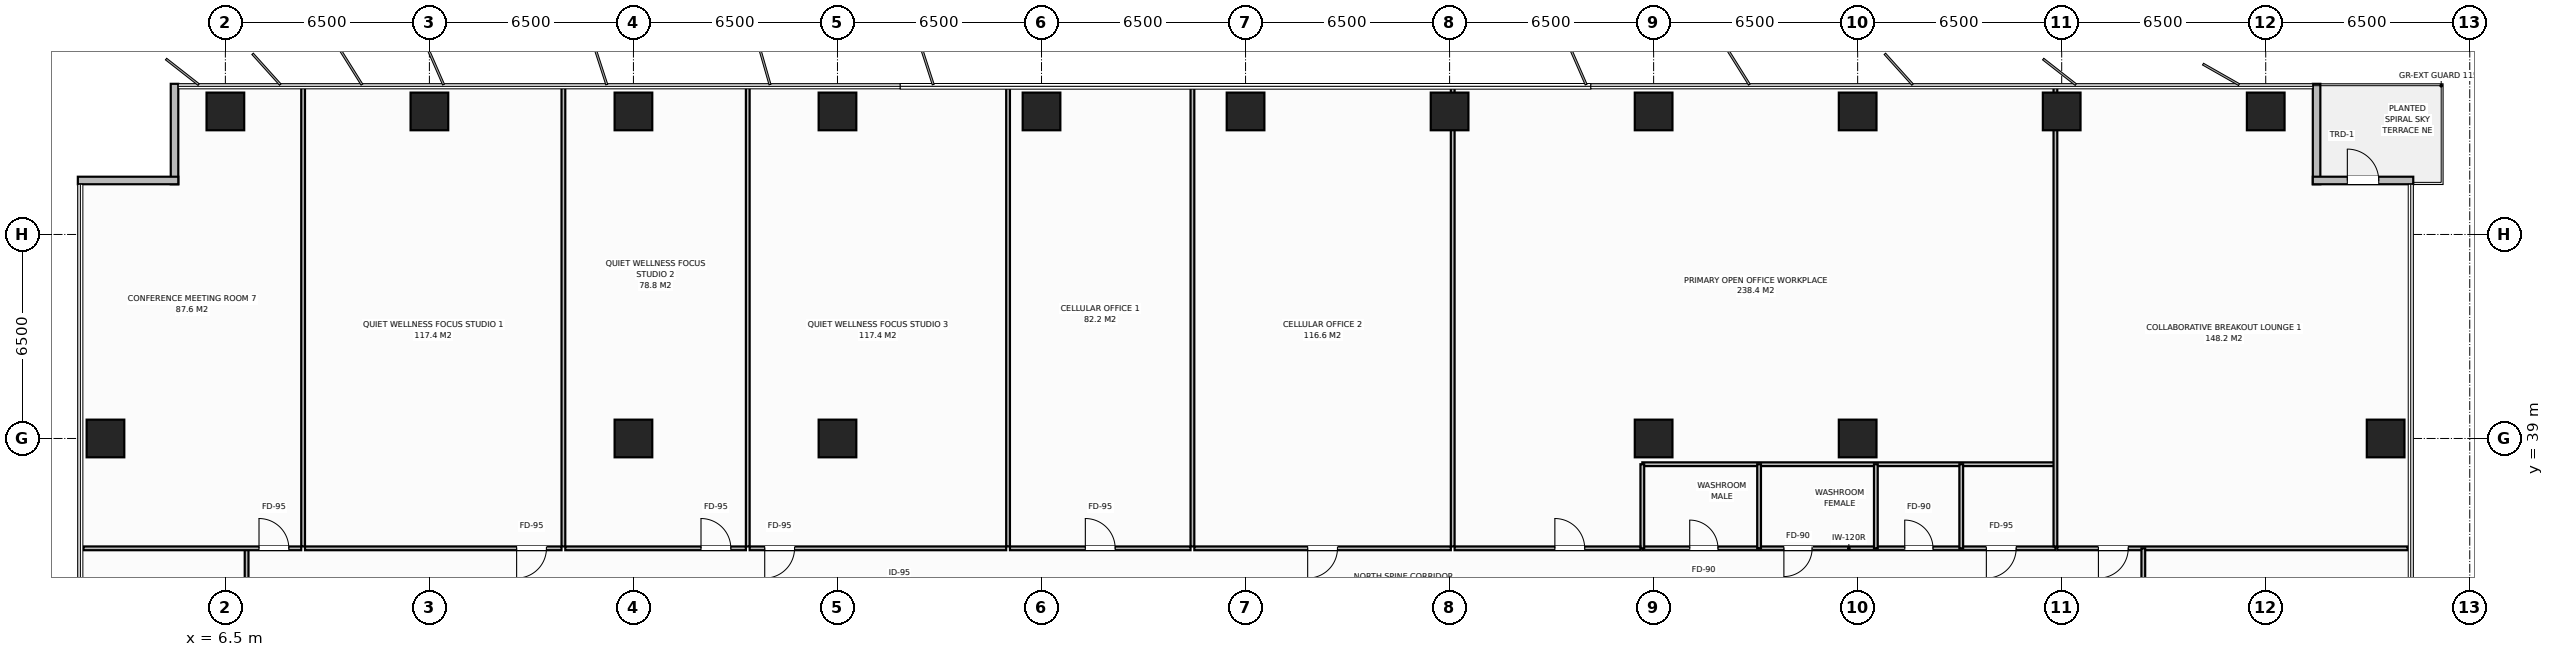
"""IFC4 building model, lengths in metres.
Left out: names, types, materials, properties, quantities, classifications, styles, units other than length and angle.
Written with IfcOpenShell. Run it as: python <this file> out.ifc"""

import sys

from ifc_helpers import new_model, si_unit, direction, frame, frame_2d, origin, origin_2d, place, context, subcontext, project, spatial, rectangle, extrude, element, fill, save


model = new_model("IFC4")
c1 = context("Model", 3, precision=1e-05, world=origin(), true_north=direction((0.0, 1.0)))
c2 = subcontext(c1, "Body", "Model", "MODEL_VIEW")
j1 = project(units=[si_unit("LENGTHUNIT", "METRE"), si_unit("PLANEANGLEUNIT", "RADIAN")], contexts=[c1])
p1 = place(None, origin())
s1 = spatial("IfcSite", under=j1, at=p1, CompositionType="ELEMENT")
p2 = place(p1, origin())
s2 = spatial("IfcBuilding", under=s1, at=p2, CompositionType="ELEMENT")
p3 = place(p2, frame((0.0, 0.0, 127.8)))
s3 = spatial("IfcBuildingStorey", under=s2, at=p3, CompositionType="ELEMENT", Elevation=127.8)
for number, where, z_axis, x_axis in (
    (1, (19.5, 39.0, 0.0), (0.0, 0.0, 1.0), (1.0, 0.0, 0.0)),
    (2, (58.5, 39.0, 0.0), (0.0, 0.0, 1.0), (1.0, 0.0, 0.0)),
    (3, (26.0, 39.0, 0.0), (0.0, 0.0, 1.0), (1.0, 0.0, 0.0)),
    (4, (52.0, 39.0, 0.0), (0.0, 0.0, 1.0), (1.0, 0.0, 0.0)),
    (5, (6.5, 49.42, 0.0), (0.0, 0.0, 1.0), (1.0, 0.0, 0.0)),
    (6, (13.0, 49.42, 0.0), (0.0, 0.0, 1.0), (1.0, 0.0, 0.0)),
    (7, (19.5, 49.42, 0.0), (0.0, 0.0, 1.0), (1.0, 0.0, 0.0)),
    (8, (26.0, 49.42, 0.0), (0.0, 0.0, 1.0), (1.0, 0.0, 0.0)),
    (9, (32.5, 49.42, 0.0), (0.0, 0.0, 1.0), (1.0, 0.0, 0.0)),
    (10, (39.0, 49.42, 0.0), (0.0, 0.0, 1.0), (1.0, 0.0, 0.0)),
    (11, (45.5, 49.42, 0.0), (0.0, 0.0, 1.0), (1.0, 0.0, 0.0)),
    (12, (52.0, 49.42, 0.0), (0.0, 0.0, 1.0), (1.0, 0.0, 0.0)),
    (13, (58.5, 49.42, 0.0), (0.0, 0.0, 1.0), (1.0, 0.0, 0.0)),
    (14, (65.0, 49.42, 0.0), (0.0, 0.0, 1.0), (1.0, 0.0, 0.0)),
    (15, (71.5, 49.42, 0.0), (0.0, 0.0, 1.0), (1.0, 0.0, 0.0)),
    (16, (2.68, 39.0, 0.0), (0.0, 0.0, 1.0), (1.0, 0.0, 0.0)),
    (17, (75.32, 39.0, 0.0), (0.0, 0.0, 1.0), (1.0, 0.0, 0.0)),
):
    element("IfcColumn", number, at=place(p3, frame(where, z_axis=z_axis, x_axis=x_axis)), inside=s3, PredefinedType="COLUMN", context=c2, shape_type="SweptSolid", body=[
        extrude(rectangle(XDim=1.2, YDim=1.2, at=origin_2d()), origin(), (0.0, 0.0, 1.0), 3.8),
    ])
for number, where, z_axis, x_axis in (
    (18, (4.88, 47.1, 0.0), (0.0, 0.0, 1.0), (0.0, 1.0, 0.0)),
    (19, (1.8, 47.22, 0.0), (0.0, 0.0, 1.0), (1.0, 0.0, 0.0)),
    (20, (73.12, 50.3, 0.0), (0.0, 0.0, 1.0), (0.0, -1.0, 0.0)),
):
    element("IfcWall", number, at=place(p3, frame(where, z_axis=z_axis, x_axis=x_axis)), inside=s3, PredefinedType="STANDARD", context=c2, shape_type="SweptSolid", body=[
        extrude(rectangle(XDim=3.2, YDim=0.24, at=frame_2d((1.6, 0.0))), origin(), (0.0, 0.0, 1.0), 3.565),
    ])
p4 = place(p3, frame((73.0, 47.22, 0.0), z_axis=(0.0, 0.0, 1.0), x_axis=(1.0, 0.0, 0.0)))
e21 = element("IfcWall", 21, at=p4, inside=s3, PredefinedType="STANDARD", context=c2, shape_type="SweptSolid", body=[
    extrude(rectangle(XDim=3.2, YDim=0.24, at=frame_2d((1.6, 0.0))), origin(), (0.0, 0.0, 1.0), 3.565),
])
p5 = place(p4, frame((1.1, 0.0, 0.0)))
e22 = element("IfcOpeningElement", 22, at=p5, cuts=e21, PredefinedType="OPENING", context=c2, shape_type="SweptSolid", body=[
    extrude(rectangle(XDim=1.0, YDim=2.2, at=frame_2d((0.5, 1.1))), frame((0.0, 0.13, 0.0), z_axis=(0.0, -1.0, 0.0), x_axis=(1.0, 0.0, 0.0)), (0.0, 0.0, 1.0), 0.26),
])
p6 = place(p3, frame((7.177, 33.4, 0.0), z_axis=(0.0, 0.0, 1.0), x_axis=(0.0, 1.0, 0.0)))
e23 = element("IfcWall", 23, at=p6, inside=s3, PredefinedType="PARTITIONING", context=c2, shape_type="SweptSolid", body=[
    extrude(rectangle(XDim=2.1, YDim=0.12, at=frame_2d((1.05, 0.0))), origin(), (0.0, 0.0, 1.0), 3.565),
])
p7 = place(p3, frame((51.64, 35.5, 0.0), z_axis=(0.0, 0.0, 1.0), x_axis=(1.0, 0.0, 0.0)))
e24 = element("IfcWall", 24, at=p7, inside=s3, PredefinedType="PARTITIONING", context=c2, shape_type="SweptSolid", body=[
    extrude(rectangle(XDim=13.16, YDim=0.12, at=frame_2d((6.58, 0.0))), origin(), (0.0, 0.0, 1.0), 3.565),
])
p8 = place(p7, frame((1.51, 0.0, 0.0)))
e25 = element("IfcOpeningElement", 25, at=p8, cuts=e24, PredefinedType="OPENING", context=c2, shape_type="SweptSolid", body=[
    extrude(rectangle(XDim=0.9, YDim=2.15, at=frame_2d((0.45, 1.075))), frame((0.0, 0.07, 0.0), z_axis=(0.0, -1.0, 0.0), x_axis=(1.0, 0.0, 0.0)), (0.0, 0.0, 1.0), 0.14),
])
p9 = place(p7, frame((4.51, 0.0, 0.0)))
e26 = element("IfcOpeningElement", 26, at=p9, cuts=e24, PredefinedType="OPENING", context=c2, shape_type="SweptSolid", body=[
    extrude(rectangle(XDim=0.9, YDim=2.15, at=frame_2d((0.45, 1.075))), frame((0.0, 0.07, 0.0), z_axis=(0.0, -1.0, 0.0), x_axis=(1.0, 0.0, 0.0)), (0.0, 0.0, 1.0), 0.14),
])
p10 = place(p7, frame((8.36, 0.0, 0.0)))
e27 = element("IfcOpeningElement", 27, at=p10, cuts=e24, PredefinedType="OPENING", context=c2, shape_type="SweptSolid", body=[
    extrude(rectangle(XDim=0.9, YDim=2.15, at=frame_2d((0.45, 1.075))), frame((0.0, 0.07, 0.0), z_axis=(0.0, -1.0, 0.0), x_axis=(1.0, 0.0, 0.0)), (0.0, 0.0, 1.0), 0.14),
])
p11 = place(p7, frame((10.96, 0.0, 0.0)))
e28 = element("IfcOpeningElement", 28, at=p11, cuts=e24, PredefinedType="OPENING", context=c2, shape_type="SweptSolid", body=[
    extrude(rectangle(XDim=0.95, YDim=2.15, at=frame_2d((0.475, 1.075))), frame((0.0, 0.07, 0.0), z_axis=(0.0, -1.0, 0.0), x_axis=(1.0, 0.0, 0.0)), (0.0, 0.0, 1.0), 0.14),
])
p12 = place(p3, frame((51.64, 38.18, 0.0), z_axis=(0.0, 0.0, 1.0), x_axis=(1.0, 0.0, 0.0)))
e29 = element("IfcWall", 29, at=p12, inside=s3, PredefinedType="PARTITIONING", context=c2, shape_type="SweptSolid", body=[
    extrude(rectangle(XDim=13.16, YDim=0.12, at=frame_2d((6.58, 0.0))), origin(), (0.0, 0.0, 1.0), 3.565),
])
for number, where, z_axis, x_axis in (
    (30, (51.64, 35.5, 0.0), (0.0, 0.0, 1.0), (0.0, 1.0, 0.0)),
    (31, (55.36, 35.5, 0.0), (0.0, 0.0, 1.0), (0.0, 1.0, 0.0)),
    (32, (59.08, 35.5, 0.0), (0.0, 0.0, 1.0), (0.0, 1.0, 0.0)),
    (33, (61.8, 35.5, 0.0), (0.0, 0.0, 1.0), (0.0, 1.0, 0.0)),
):
    element("IfcWall", number, at=place(p3, frame(where, z_axis=z_axis, x_axis=x_axis)), inside=s3, PredefinedType="PARTITIONING", context=c2, shape_type="SweptSolid", body=[
        extrude(rectangle(XDim=2.68, YDim=0.12, at=frame_2d((1.34, 0.0))), origin(), (0.0, 0.0, 1.0), 3.565),
    ])
p13 = place(p3, frame((8.977, 35.56, 0.0), z_axis=(0.0, 0.0, 1.0), x_axis=(0.0, 1.0, 0.0)))
e34 = element("IfcWall", 34, at=p13, inside=s3, PredefinedType="PARTITIONING", context=c2, shape_type="SweptSolid", body=[
    extrude(rectangle(XDim=14.72, YDim=0.12, at=frame_2d((7.36, 0.0))), origin(), (0.0, 0.0, 1.0), 3.565),
])
p14 = place(p3, frame((1.98, 35.5, 0.0), z_axis=(0.0, 0.0, 1.0), x_axis=(1.0, 0.0, 0.0)))
e35 = element("IfcWall", 35, at=p14, inside=s3, PredefinedType="PARTITIONING", context=c2, shape_type="SweptSolid", body=[
    extrude(rectangle(XDim=6.937, YDim=0.12, at=frame_2d((3.468, 0.0))), origin(), (0.0, 0.0, 1.0), 3.565),
])
p15 = place(p14, frame((5.592, 0.0, 0.0)))
e36 = element("IfcOpeningElement", 36, at=p15, cuts=e35, PredefinedType="OPENING", context=c2, shape_type="SweptSolid", body=[
    extrude(rectangle(XDim=0.95, YDim=2.15, at=frame_2d((0.475, 1.075))), frame((0.0, 0.07, 0.0), z_axis=(0.0, -1.0, 0.0), x_axis=(1.0, 0.0, 0.0)), (0.0, 0.0, 1.0), 0.14),
])
p16 = place(p3, frame((17.269, 35.56, 0.0), z_axis=(0.0, 0.0, 1.0), x_axis=(0.0, 1.0, 0.0)))
e37 = element("IfcWall", 37, at=p16, inside=s3, PredefinedType="PARTITIONING", context=c2, shape_type="SweptSolid", body=[
    extrude(rectangle(XDim=14.72, YDim=0.12, at=frame_2d((7.36, 0.0))), origin(), (0.0, 0.0, 1.0), 3.565),
])
p17 = place(p3, frame((9.037, 35.5, 0.0), z_axis=(0.0, 0.0, 1.0), x_axis=(1.0, 0.0, 0.0)))
e38 = element("IfcWall", 38, at=p17, inside=s3, PredefinedType="PARTITIONING", context=c2, shape_type="SweptSolid", body=[
    extrude(rectangle(XDim=8.172, YDim=0.12, at=frame_2d((4.086, 0.0))), origin(), (0.0, 0.0, 1.0), 3.565),
])
p18 = place(p17, frame((6.742, 0.0, 0.0)))
e39 = element("IfcOpeningElement", 39, at=p18, cuts=e38, PredefinedType="OPENING", context=c2, shape_type="SweptSolid", body=[
    extrude(rectangle(XDim=0.95, YDim=2.15, at=frame_2d((0.475, 1.075))), frame((0.0, 0.07, 0.0), z_axis=(0.0, -1.0, 0.0), x_axis=(1.0, 0.0, 0.0)), (0.0, 0.0, 1.0), 0.14),
])
p19 = place(p3, frame((23.142, 35.56, 0.0), z_axis=(0.0, 0.0, 1.0), x_axis=(0.0, 1.0, 0.0)))
e40 = element("IfcWall", 40, at=p19, inside=s3, PredefinedType="PARTITIONING", context=c2, shape_type="SweptSolid", body=[
    extrude(rectangle(XDim=14.72, YDim=0.12, at=frame_2d((7.36, 0.0))), origin(), (0.0, 0.0, 1.0), 3.565),
])
p20 = place(p3, frame((17.329, 35.5, 0.0), z_axis=(0.0, 0.0, 1.0), x_axis=(1.0, 0.0, 0.0)))
e41 = element("IfcWall", 41, at=p20, inside=s3, PredefinedType="PARTITIONING", context=c2, shape_type="SweptSolid", body=[
    extrude(rectangle(XDim=5.754, YDim=0.12, at=frame_2d((2.877, 0.0))), origin(), (0.0, 0.0, 1.0), 3.565),
])
p21 = place(p20, frame((4.323, 0.0, 0.0)))
e42 = element("IfcOpeningElement", 42, at=p21, cuts=e41, PredefinedType="OPENING", context=c2, shape_type="SweptSolid", body=[
    extrude(rectangle(XDim=0.95, YDim=2.15, at=frame_2d((0.475, 1.075))), frame((0.0, 0.07, 0.0), z_axis=(0.0, -1.0, 0.0), x_axis=(1.0, 0.0, 0.0)), (0.0, 0.0, 1.0), 0.14),
])
p22 = place(p3, frame((31.434, 35.56, 0.0), z_axis=(0.0, 0.0, 1.0), x_axis=(0.0, 1.0, 0.0)))
e43 = element("IfcWall", 43, at=p22, inside=s3, PredefinedType="PARTITIONING", context=c2, shape_type="SweptSolid", body=[
    extrude(rectangle(XDim=14.72, YDim=0.12, at=frame_2d((7.36, 0.0))), origin(), (0.0, 0.0, 1.0), 3.565),
])
p23 = place(p3, frame((23.202, 35.5, 0.0), z_axis=(0.0, 0.0, 1.0), x_axis=(1.0, 0.0, 0.0)))
e44 = element("IfcWall", 44, at=p23, inside=s3, PredefinedType="PARTITIONING", context=c2, shape_type="SweptSolid", body=[
    extrude(rectangle(XDim=8.172, YDim=0.12, at=frame_2d((4.086, 0.0))), origin(), (0.0, 0.0, 1.0), 3.565),
])
p24 = place(p23, frame((0.48, 0.0, 0.0)))
e45 = element("IfcOpeningElement", 45, at=p24, cuts=e44, PredefinedType="OPENING", context=c2, shape_type="SweptSolid", body=[
    extrude(rectangle(XDim=0.95, YDim=2.15, at=frame_2d((0.475, 1.075))), frame((0.0, 0.07, 0.0), z_axis=(0.0, -1.0, 0.0), x_axis=(1.0, 0.0, 0.0)), (0.0, 0.0, 1.0), 0.14),
])
p25 = place(p3, frame((37.308, 35.56, 0.0), z_axis=(0.0, 0.0, 1.0), x_axis=(0.0, 1.0, 0.0)))
e46 = element("IfcWall", 46, at=p25, inside=s3, PredefinedType="PARTITIONING", context=c2, shape_type="SweptSolid", body=[
    extrude(rectangle(XDim=14.72, YDim=0.12, at=frame_2d((7.36, 0.0))), origin(), (0.0, 0.0, 1.0), 3.565),
])
p26 = place(p3, frame((31.494, 35.5, 0.0), z_axis=(0.0, 0.0, 1.0), x_axis=(1.0, 0.0, 0.0)))
e47 = element("IfcWall", 47, at=p26, inside=s3, PredefinedType="PARTITIONING", context=c2, shape_type="SweptSolid", body=[
    extrude(rectangle(XDim=5.753, YDim=0.12, at=frame_2d((2.877, 0.0))), origin(), (0.0, 0.0, 1.0), 3.565),
])
p27 = place(p26, frame((2.402, 0.0, 0.0)))
e48 = element("IfcOpeningElement", 48, at=p27, cuts=e47, PredefinedType="OPENING", context=c2, shape_type="SweptSolid", body=[
    extrude(rectangle(XDim=0.95, YDim=2.15, at=frame_2d((0.475, 1.075))), frame((0.0, 0.07, 0.0), z_axis=(0.0, -1.0, 0.0), x_axis=(1.0, 0.0, 0.0)), (0.0, 0.0, 1.0), 0.14),
])
p28 = place(p3, frame((45.6, 35.56, 0.0), z_axis=(0.0, 0.0, 1.0), x_axis=(0.0, 1.0, 0.0)))
e49 = element("IfcWall", 49, at=p28, inside=s3, PredefinedType="PARTITIONING", context=c2, shape_type="SweptSolid", body=[
    extrude(rectangle(XDim=14.72, YDim=0.12, at=frame_2d((7.36, 0.0))), origin(), (0.0, 0.0, 1.0), 2.965),
])
p29 = place(p3, frame((37.368, 35.5, 0.0), z_axis=(0.0, 0.0, 1.0), x_axis=(1.0, 0.0, 0.0)))
e50 = element("IfcWall", 50, at=p29, inside=s3, PredefinedType="PARTITIONING", context=c2, shape_type="SweptSolid", body=[
    extrude(rectangle(XDim=8.172, YDim=0.12, at=frame_2d((4.086, 0.0))), origin(), (0.0, 0.0, 1.0), 3.565),
])
p30 = place(p29, frame((3.611, 0.0, 0.0)))
e51 = element("IfcOpeningElement", 51, at=p30, cuts=e50, PredefinedType="OPENING", context=c2, shape_type="SweptSolid", body=[
    extrude(rectangle(XDim=0.95, YDim=2.15, at=frame_2d((0.475, 1.075))), frame((0.0, 0.07, 0.0), z_axis=(0.0, -1.0, 0.0), x_axis=(1.0, 0.0, 0.0)), (0.0, 0.0, 1.0), 0.14),
])
p31 = place(p3, frame((64.8, 35.56, 0.0), z_axis=(0.0, 0.0, 1.0), x_axis=(0.0, 1.0, 0.0)))
e52 = element("IfcWall", 52, at=p31, inside=s3, PredefinedType="PARTITIONING", context=c2, shape_type="SweptSolid", body=[
    extrude(rectangle(XDim=14.72, YDim=0.12, at=frame_2d((7.36, 0.0))), origin(), (0.0, 0.0, 1.0), 2.965),
])
p32 = place(p3, frame((45.66, 35.5, 0.0), z_axis=(0.0, 0.0, 1.0), x_axis=(1.0, 0.0, 0.0)))
e53 = element("IfcWall", 53, at=p32, inside=s3, PredefinedType="PARTITIONING", context=c2, shape_type="SweptSolid", body=[
    extrude(rectangle(XDim=5.92, YDim=0.12, at=frame_2d((2.96, 0.0))), origin(), (0.0, 0.0, 1.0), 3.565),
])
p33 = place(p32, frame((3.194, 0.0, 0.0)))
e54 = element("IfcOpeningElement", 54, at=p33, cuts=e53, PredefinedType="OPENING", context=c2, shape_type="SweptSolid", body=[
    extrude(rectangle(XDim=0.95, YDim=2.15, at=frame_2d((0.475, 1.075))), frame((0.0, 0.07, 0.0), z_axis=(0.0, -1.0, 0.0), x_axis=(1.0, 0.0, 0.0)), (0.0, 0.0, 1.0), 0.14),
])
p34 = place(p3, frame((64.86, 35.5, 0.0), z_axis=(0.0, 0.0, 1.0), x_axis=(1.0, 0.0, 0.0)))
e55 = element("IfcWall", 55, at=p34, inside=s3, PredefinedType="PARTITIONING", context=c2, shape_type="SweptSolid", body=[
    extrude(rectangle(XDim=11.16, YDim=0.12, at=frame_2d((5.58, 0.0))), origin(), (0.0, 0.0, 1.0), 3.565),
])
p35 = place(p34, frame((1.31, 0.0, 0.0)))
e56 = element("IfcOpeningElement", 56, at=p35, cuts=e55, PredefinedType="OPENING", context=c2, shape_type="SweptSolid", body=[
    extrude(rectangle(XDim=0.95, YDim=2.15, at=frame_2d((0.475, 1.075))), frame((0.0, 0.07, 0.0), z_axis=(0.0, -1.0, 0.0), x_axis=(1.0, 0.0, 0.0)), (0.0, 0.0, 1.0), 0.14),
])
p36 = place(p3, frame((67.6, 27.05, 0.0), z_axis=(0.0, 0.0, 1.0), x_axis=(0.0, 1.0, 0.0)))
e57 = element("IfcWall", 57, at=p36, inside=s3, PredefinedType="PARTITIONING", context=c2, shape_type="SweptSolid", body=[
    extrude(rectangle(XDim=8.45, YDim=0.12, at=frame_2d((4.225, 0.0))), origin(), (0.0, 0.0, 1.0), 3.565),
])
p37 = place(p36, frame((2.7, 0.0, 0.0)))
e58 = element("IfcOpeningElement", 58, at=p37, cuts=e57, PredefinedType="OPENING", context=c2, shape_type="SweptSolid", body=[
    extrude(rectangle(XDim=0.95, YDim=2.15, at=frame_2d((0.475, 1.075))), frame((0.0, 0.07, 0.0), z_axis=(0.0, -1.0, 0.0), x_axis=(1.0, 0.0, 0.0)), (0.0, 0.0, 1.0), 0.14),
])
p38 = place(p5, origin())
e59 = element("IfcDoor", 59, at=p38, inside=s3, OperationType="SINGLE_SWING_LEFT", PredefinedType="DOOR", context=c2, shape_type="SweptSolid", body=[
    extrude(rectangle(XDim=1.0, YDim=2.2, at=frame_2d((0.5, 1.1))), frame((0.0, 0.025, 0.0), z_axis=(0.0, -1.0, 0.0), x_axis=(1.0, 0.0, 0.0)), (0.0, 0.0, 1.0), 0.05),
])
fill(e22, e59)
p39 = place(p8, origin())
e60 = element("IfcDoor", 60, at=p39, inside=s3, OperationType="SINGLE_SWING_LEFT", PredefinedType="DOOR", context=c2, shape_type="SweptSolid", body=[
    extrude(rectangle(XDim=0.9, YDim=2.15, at=frame_2d((0.45, 1.075))), frame((0.0, 0.025, 0.0), z_axis=(0.0, -1.0, 0.0), x_axis=(1.0, 0.0, 0.0)), (0.0, 0.0, 1.0), 0.05),
])
fill(e25, e60)
p40 = place(p9, origin())
e61 = element("IfcDoor", 61, at=p40, inside=s3, OperationType="SINGLE_SWING_RIGHT", PredefinedType="DOOR", context=c2, shape_type="SweptSolid", body=[
    extrude(rectangle(XDim=0.9, YDim=2.15, at=frame_2d((0.45, 1.075))), frame((0.0, 0.025, 0.0), z_axis=(0.0, -1.0, 0.0), x_axis=(1.0, 0.0, 0.0)), (0.0, 0.0, 1.0), 0.05),
])
fill(e26, e61)
p41 = place(p10, origin())
e62 = element("IfcDoor", 62, at=p41, inside=s3, OperationType="SINGLE_SWING_LEFT", PredefinedType="DOOR", context=c2, shape_type="SweptSolid", body=[
    extrude(rectangle(XDim=0.9, YDim=2.15, at=frame_2d((0.45, 1.075))), frame((0.0, 0.025, 0.0), z_axis=(0.0, -1.0, 0.0), x_axis=(1.0, 0.0, 0.0)), (0.0, 0.0, 1.0), 0.05),
])
fill(e27, e62)
p42 = place(p11, origin())
e63 = element("IfcDoor", 63, at=p42, inside=s3, OperationType="SINGLE_SWING_RIGHT", PredefinedType="DOOR", context=c2, shape_type="SweptSolid", body=[
    extrude(rectangle(XDim=0.95, YDim=2.15, at=frame_2d((0.475, 1.075))), frame((0.0, 0.025, 0.0), z_axis=(0.0, -1.0, 0.0), x_axis=(1.0, 0.0, 0.0)), (0.0, 0.0, 1.0), 0.05),
])
fill(e28, e63)
p43 = place(p15, origin())
e64 = element("IfcDoor", 64, at=p43, inside=s3, OperationType="SINGLE_SWING_LEFT", PredefinedType="DOOR", context=c2, shape_type="SweptSolid", body=[
    extrude(rectangle(XDim=0.95, YDim=2.15, at=frame_2d((0.475, 1.075))), frame((0.0, 0.025, 0.0), z_axis=(0.0, -1.0, 0.0), x_axis=(1.0, 0.0, 0.0)), (0.0, 0.0, 1.0), 0.05),
])
fill(e36, e64)
p44 = place(p18, origin())
e65 = element("IfcDoor", 65, at=p44, inside=s3, OperationType="SINGLE_SWING_RIGHT", PredefinedType="DOOR", context=c2, shape_type="SweptSolid", body=[
    extrude(rectangle(XDim=0.95, YDim=2.15, at=frame_2d((0.475, 1.075))), frame((0.0, 0.025, 0.0), z_axis=(0.0, -1.0, 0.0), x_axis=(1.0, 0.0, 0.0)), (0.0, 0.0, 1.0), 0.05),
])
fill(e39, e65)
p45 = place(p21, origin())
e66 = element("IfcDoor", 66, at=p45, inside=s3, OperationType="SINGLE_SWING_LEFT", PredefinedType="DOOR", context=c2, shape_type="SweptSolid", body=[
    extrude(rectangle(XDim=0.95, YDim=2.15, at=frame_2d((0.475, 1.075))), frame((0.0, 0.025, 0.0), z_axis=(0.0, -1.0, 0.0), x_axis=(1.0, 0.0, 0.0)), (0.0, 0.0, 1.0), 0.05),
])
fill(e42, e66)
p46 = place(p24, origin())
e67 = element("IfcDoor", 67, at=p46, inside=s3, OperationType="SINGLE_SWING_RIGHT", PredefinedType="DOOR", context=c2, shape_type="SweptSolid", body=[
    extrude(rectangle(XDim=0.95, YDim=2.15, at=frame_2d((0.475, 1.075))), frame((0.0, 0.025, 0.0), z_axis=(0.0, -1.0, 0.0), x_axis=(1.0, 0.0, 0.0)), (0.0, 0.0, 1.0), 0.05),
])
fill(e45, e67)
p47 = place(p27, origin())
e68 = element("IfcDoor", 68, at=p47, inside=s3, OperationType="SINGLE_SWING_LEFT", PredefinedType="DOOR", context=c2, shape_type="SweptSolid", body=[
    extrude(rectangle(XDim=0.95, YDim=2.15, at=frame_2d((0.475, 1.075))), frame((0.0, 0.025, 0.0), z_axis=(0.0, -1.0, 0.0), x_axis=(1.0, 0.0, 0.0)), (0.0, 0.0, 1.0), 0.05),
])
fill(e48, e68)
p48 = place(p30, origin())
e69 = element("IfcDoor", 69, at=p48, inside=s3, OperationType="SINGLE_SWING_RIGHT", PredefinedType="DOOR", context=c2, shape_type="SweptSolid", body=[
    extrude(rectangle(XDim=0.95, YDim=2.15, at=frame_2d((0.475, 1.075))), frame((0.0, 0.025, 0.0), z_axis=(0.0, -1.0, 0.0), x_axis=(1.0, 0.0, 0.0)), (0.0, 0.0, 1.0), 0.05),
])
fill(e51, e69)
p49 = place(p33, origin())
e70 = element("IfcDoor", 70, at=p49, inside=s3, OperationType="SINGLE_SWING_LEFT", PredefinedType="DOOR", context=c2, shape_type="SweptSolid", body=[
    extrude(rectangle(XDim=0.95, YDim=2.15, at=frame_2d((0.475, 1.075))), frame((0.0, 0.025, 0.0), z_axis=(0.0, -1.0, 0.0), x_axis=(1.0, 0.0, 0.0)), (0.0, 0.0, 1.0), 0.05),
])
fill(e54, e70)
p50 = place(p35, origin())
e71 = element("IfcDoor", 71, at=p50, inside=s3, OperationType="SINGLE_SWING_RIGHT", PredefinedType="DOOR", context=c2, shape_type="SweptSolid", body=[
    extrude(rectangle(XDim=0.95, YDim=2.15, at=frame_2d((0.475, 1.075))), frame((0.0, 0.025, 0.0), z_axis=(0.0, -1.0, 0.0), x_axis=(1.0, 0.0, 0.0)), (0.0, 0.0, 1.0), 0.05),
])
fill(e56, e71)
save(model, sys.argv[1])
